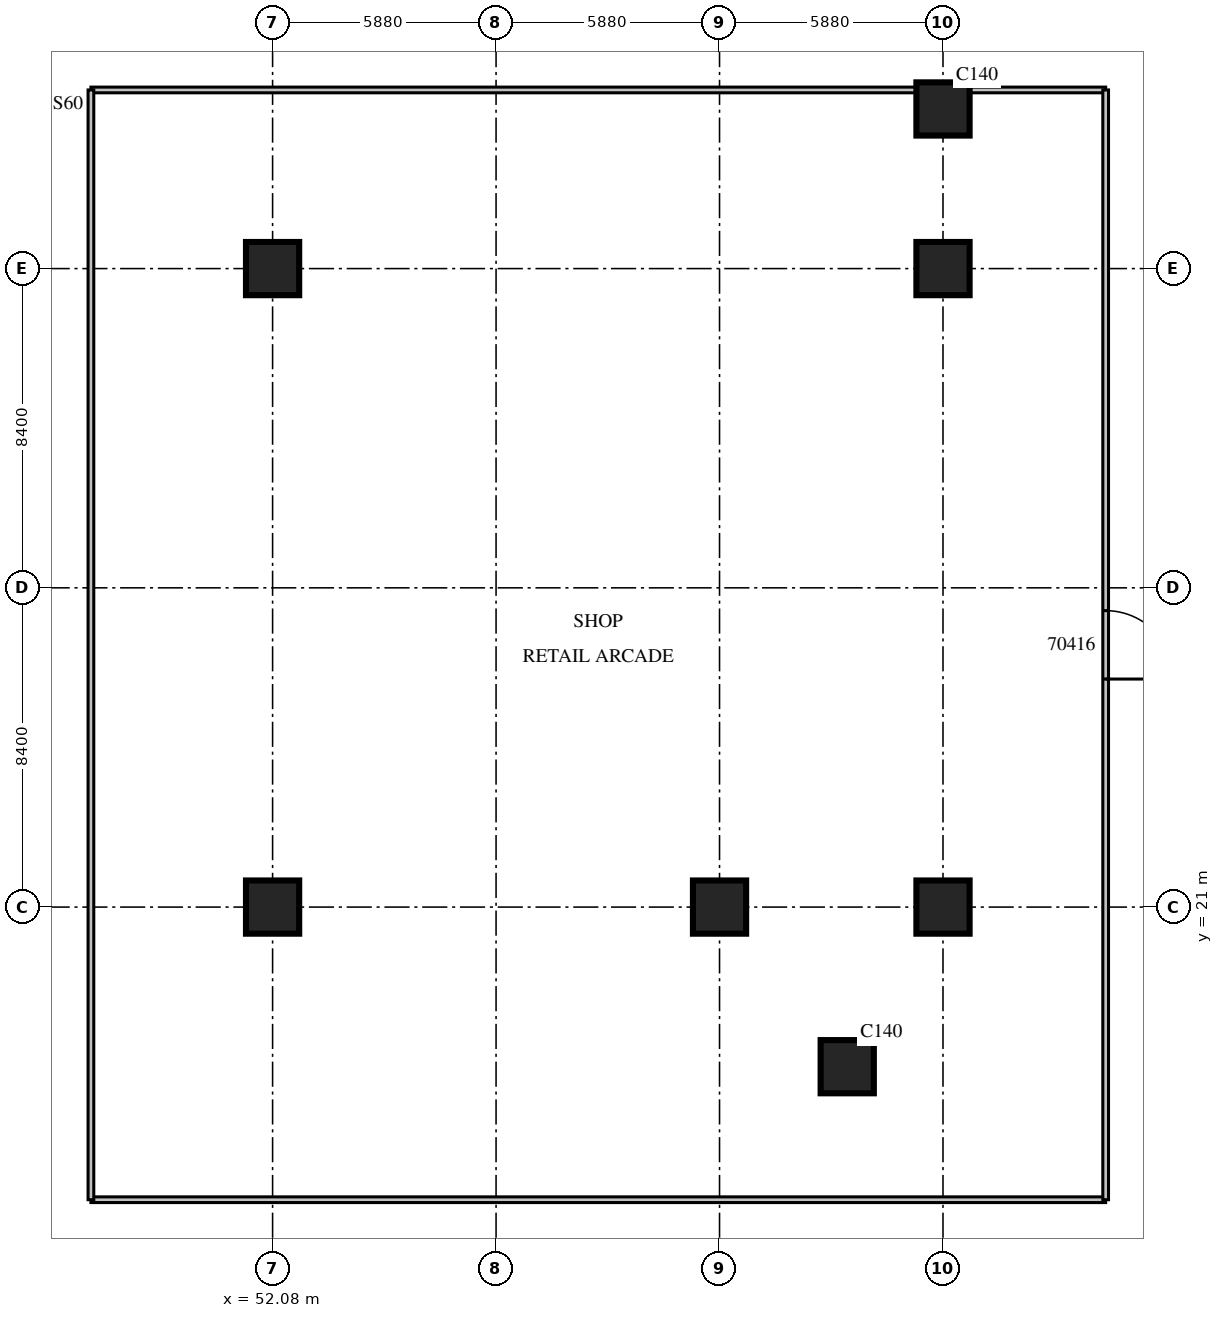
"""IFC4 building model, lengths in metres.
Left out: names, types, materials, properties, quantities, classifications, styles, units other than length and angle.
Written with IfcOpenShell. Run it as: python <this file> out.ifc"""

import sys

from ifc_helpers import new_model, si_unit, direction, frame, frame_2d, origin, origin_2d, place, context, subcontext, project, spatial, rectangle, extrude, source, transform, mapped, element, fill, save


model = new_model("IFC4")
c1 = context("Model", 3, precision=1e-05, world=origin(), true_north=direction((0.0, 1.0)))
c2 = subcontext(c1, "Body", "Model", "MODEL_VIEW")
j1 = project(units=[si_unit("LENGTHUNIT", "METRE"), si_unit("PLANEANGLEUNIT", "RADIAN")], contexts=[c1])
p1 = place(None, origin())
s1 = spatial("IfcSite", under=j1, at=p1, CompositionType="ELEMENT")
p2 = place(p1, origin())
s2 = spatial("IfcBuilding", under=s1, at=p2, CompositionType="ELEMENT")
p3 = place(p2, frame((0.0, 0.0, 7.5)))
s3 = spatial("IfcBuildingStorey", under=s2, at=p3, CompositionType="ELEMENT", Elevation=7.5)
m1 = source(origin(), c2, "Body", "SweptSolid", [
    extrude(rectangle(XDim=1.4, YDim=1.4, at=origin_2d()), origin(), (0.0, 0.0, 1.0), 5.4),
])
for number, where, z_axis, x_axis in (
    (1, (52.08, 21.0, 0.0), (0.0, 0.0, 1.0), (1.0, 0.0, 0.0)),
    (2, (52.08, 37.8, 0.0), (0.0, 0.0, 1.0), (1.0, 0.0, 0.0)),
    (3, (63.84, 21.0, 0.0), (0.0, 0.0, 1.0), (1.0, 0.0, 0.0)),
    (4, (67.2, 16.8, 0.0), (0.0, 0.0, 1.0), (1.0, 0.0, 0.0)),
    (5, (69.72, 21.0, 0.0), (0.0, 0.0, 1.0), (1.0, 0.0, 0.0)),
    (6, (69.72, 37.8, 0.0), (0.0, 0.0, 1.0), (1.0, 0.0, 0.0)),
    (7, (69.72, 42.0, 0.0), (0.0, 0.0, 1.0), (1.0, 0.0, 0.0)),
):
    element("IfcColumn", number, at=place(p3, frame(where, z_axis=z_axis, x_axis=x_axis)), inside=s3, PredefinedType="COLUMN", context=c2, shape_type="MappedRepresentation", body=[
        mapped(m1, transform((0.0, 0.0, 0.0), scale=1.0)),
    ])
p4 = place(p3, frame((47.3, 13.3, 0.0), z_axis=(0.0, 0.0, 1.0), x_axis=(1.0, 0.0, 0.0)))
e8 = element("IfcWall", 8, at=p4, inside=s3, PredefinedType="PARTITIONING", context=c2, shape_type="SweptSolid", body=[
    extrude(rectangle(XDim=26.7, YDim=0.15, at=frame_2d((13.35, 0.0))), origin(), (0.0, 0.0, 1.0), 4.8),
])
m2 = source(origin(), c2, "Body", "SweptSolid", [
    extrude(rectangle(XDim=26.7, YDim=0.15, at=frame_2d((13.35, 0.0))), origin(), (0.0, 0.0, 1.0), 4.8),
])
p5 = place(p3, frame((47.3, 42.5, 0.0), z_axis=(0.0, 0.0, 1.0), x_axis=(1.0, 0.0, 0.0)))
e9 = element("IfcWall", 9, at=p5, inside=s3, PredefinedType="PARTITIONING", context=c2, shape_type="MappedRepresentation", body=[
    mapped(m2, transform((0.0, 0.0, 0.0), scale=1.0)),
])
m3 = source(origin(), c2, "Body", "SweptSolid", [
    extrude(rectangle(XDim=29.2, YDim=0.15, at=frame_2d((14.6, 0.0))), origin(), (0.0, 0.0, 1.0), 4.8),
])
p6 = place(p3, frame((47.3, 13.3, 0.0), z_axis=(0.0, 0.0, 1.0), x_axis=(0.0, 1.0, 0.0)))
e10 = element("IfcWall", 10, at=p6, inside=s3, PredefinedType="PARTITIONING", context=c2, shape_type="MappedRepresentation", body=[
    mapped(m3, transform((0.0, 0.0, 0.0), scale=1.0)),
])
p7 = place(p3, frame((74.0, 13.3, 0.0), z_axis=(0.0, 0.0, 1.0), x_axis=(0.0, 1.0, 0.0)))
e11 = element("IfcWall", 11, at=p7, inside=s3, PredefinedType="PARTITIONING", context=c2, shape_type="MappedRepresentation", body=[
    mapped(m3, transform((0.0, 0.0, 0.0), scale=1.0)),
])
m4 = source(origin(), c2, "Body", "SweptSolid", [
    extrude(rectangle(XDim=1.8, YDim=2.1, at=frame_2d((0.9, 1.05))), frame((0.0, 0.085, 0.0), z_axis=(0.0, -1.0, 0.0), x_axis=(1.0, 0.0, 0.0)), (0.0, 0.0, 1.0), 0.17),
])
p8 = place(p7, frame((13.7, 0.0, 0.0)))
e12 = element("IfcOpeningElement", 12, at=p8, cuts=e11, PredefinedType="OPENING", context=c2, shape_type="MappedRepresentation", body=[
    mapped(m4, transform((0.0, 0.0, 0.0), scale=1.0)),
])
m5 = source(origin(), c2, "Body", "SweptSolid", [
    extrude(rectangle(XDim=1.8, YDim=2.1, at=frame_2d((0.9, 1.05))), frame((0.0, 0.025, 0.0), z_axis=(0.0, -1.0, 0.0), x_axis=(1.0, 0.0, 0.0)), (0.0, 0.0, 1.0), 0.05),
])
p9 = place(p8, origin())
e13 = element("IfcDoor", 13, at=p9, inside=s3, OperationType="DOUBLE_DOOR_SINGLE_SWING", PredefinedType="DOOR", context=c2, shape_type="MappedRepresentation", body=[
    mapped(m5, transform((0.0, 0.0, 0.0), scale=1.0)),
])
fill(e12, e13)
save(model, sys.argv[1])
